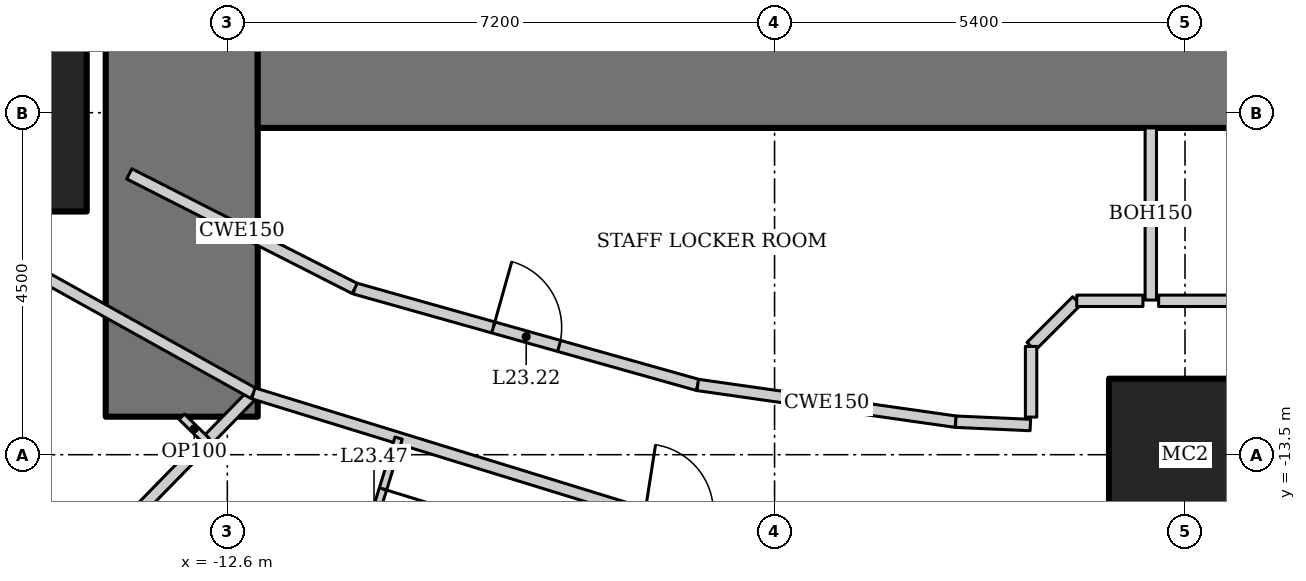
"""IFC4 building model, lengths in metres.
Left out: names, types, materials, properties, quantities, classifications, styles, units other than length and angle.
Written with IfcOpenShell. Run it as: python <this file> out.ifc"""

import sys

from ifc_helpers import new_model, si_unit, direction, frame, frame_2d, origin, origin_2d, place, context, subcontext, project, spatial, rectangle, hollow_rectangle, extrude, element, fill, save


model = new_model("IFC4")
c1 = context("Model", 3, precision=1e-05, world=origin(), true_north=direction((0.0, 1.0)))
c2 = subcontext(c1, "Body", "Model", "MODEL_VIEW")
j1 = project(units=[si_unit("LENGTHUNIT", "METRE"), si_unit("PLANEANGLEUNIT", "RADIAN")], contexts=[c1])
p1 = place(None, origin())
s1 = spatial("IfcSite", under=j1, at=p1, CompositionType="ELEMENT")
p2 = place(p1, origin())
s2 = spatial("IfcBuilding", under=s1, at=p2, CompositionType="ELEMENT")
p3 = place(p2, frame((0.0, 0.0, 98.2)))
s3 = spatial("IfcBuildingStorey", under=s2, at=p3, CompositionType="ELEMENT", Elevation=98.2)
p4 = place(p3, frame((-15.75, -9.0, 0.0), z_axis=(0.0, 0.0, 1.0), x_axis=(1.0, 0.0, 0.0)))
e1 = element("IfcColumn", 1, at=p4, inside=s3, PredefinedType="COLUMN", context=c2, shape_type="SweptSolid", body=[
    extrude(hollow_rectangle(XDim=2.6, YDim=2.6, WallThickness=0.13, at=origin_2d()), origin(), (0.0, 0.0, 1.0), 3.6),
])
p5 = place(p3, frame((0.0, -13.5, 0.0), z_axis=(0.0, 0.0, 1.0), x_axis=(1.0, 0.0, 0.0)))
e2 = element("IfcColumn", 2, at=p5, inside=s3, PredefinedType="COLUMN", context=c2, shape_type="SweptSolid", body=[
    extrude(hollow_rectangle(XDim=2.0, YDim=2.0, WallThickness=0.17, at=origin_2d()), origin(), (0.0, 0.0, 1.0), 3.6),
])
p6 = place(p3, frame((-13.2, 13.0, 0.0), z_axis=(0.0, 0.0, 1.0), x_axis=(0.0, -1.0, 0.0)))
e3 = element("IfcWall", 3, at=p6, inside=s3, PredefinedType="SHEAR", context=c2, shape_type="SweptSolid", body=[
    extrude(rectangle(XDim=26.0, YDim=2.0, at=frame_2d((13.0, 0.0))), origin(), (0.0, 0.0, 1.0), 3.6),
])
p7 = place(p6, frame((12.1, 0.0, 0.0)))
e4 = element("IfcOpeningElement", 4, at=p7, cuts=e3, PredefinedType="OPENING", context=c2, shape_type="SweptSolid", body=[
    extrude(rectangle(XDim=1.8, YDim=2.1, at=frame_2d((0.9, 1.05))), frame((0.0, 1.01, 0.0), z_axis=(0.0, -1.0, 0.0), x_axis=(1.0, 0.0, 0.0)), (0.0, 0.0, 1.0), 2.02),
])
p8 = place(p3, frame((-12.2, -8.0, 0.0), z_axis=(0.0, 0.0, 1.0), x_axis=(1.0, 0.0, 0.0)))
e5 = element("IfcWall", 5, at=p8, inside=s3, PredefinedType="SHEAR", context=c2, shape_type="SweptSolid", body=[
    extrude(rectangle(XDim=24.4, YDim=2.4, at=frame_2d((12.2, 0.0))), origin(), (0.0, 0.0, 1.0), 3.6),
])
p9 = place(p3, frame((-17.97, -18.542, 0.0), z_axis=(0.0, 0.0, 1.0), x_axis=(0.698757291878, 0.715358823981, 0.0)))
e6 = element("IfcWall", 6, at=p9, inside=s3, PredefinedType="PARTITIONING", context=c2, shape_type="SweptSolid", body=[
    extrude(rectangle(XDim=8.177, YDim=0.15, at=frame_2d((4.088, 0.0))), origin(), (0.0, 0.0, 1.0), 2.528),
])
p10 = place(p3, frame((-17.299, -9.885, 0.0), z_axis=(0.0, 0.0, 1.0), x_axis=(0.873695910579, -0.486472461541, 0.0)))
e7 = element("IfcWall", 7, at=p10, inside=s3, PredefinedType="PARTITIONING", context=c2, shape_type="SweptSolid", body=[
    extrude(rectangle(XDim=5.771, YDim=0.15, at=frame_2d((2.885, 0.0))), origin(), (0.0, 0.0, 1.0), 3.45),
])
p11 = place(p3, frame((-12.257, -12.693, 0.0), z_axis=(0.0, 0.0, 1.0), x_axis=(0.955657956744, -0.294478980085, 0.0)))
e8 = element("IfcWall", 8, at=p11, inside=s3, PredefinedType="PARTITIONING", context=c2, shape_type="SweptSolid", body=[
    extrude(rectangle(XDim=5.236, YDim=0.15, at=frame_2d((2.618, 0.0))), origin(), (0.0, 0.0, 1.0), 3.45),
])
p12 = place(p3, frame((-10.924, -11.312, 0.0), z_axis=(0.0, 0.0, 1.0), x_axis=(0.962643729928, -0.270771211967, 0.0)))
e9 = element("IfcWall", 9, at=p12, inside=s3, PredefinedType="PARTITIONING", context=c2, shape_type="SweptSolid", body=[
    extrude(rectangle(XDim=4.688, YDim=0.15, at=frame_2d((2.344, 0.0))), origin(), (0.0, 0.0, 1.0), 3.45),
])
p13 = place(p12, frame((1.894, 0.0, 0.0)))
e10 = element("IfcOpeningElement", 10, at=p13, cuts=e9, PredefinedType="OPENING", context=c2, shape_type="SweptSolid", body=[
    extrude(rectangle(XDim=0.9, YDim=2.1, at=frame_2d((0.45, 1.05))), frame((0.0, 0.085, 0.0), z_axis=(0.0, -1.0, 0.0), x_axis=(1.0, 0.0, 0.0)), (0.0, 0.0, 1.0), 0.17),
])
p14 = place(p3, frame((-6.411, -12.582, 0.0), z_axis=(0.0, 0.0, 1.0), x_axis=(0.990002114939, -0.14105251652, 0.0)))
e11 = element("IfcWall", 11, at=p14, inside=s3, PredefinedType="PARTITIONING", context=c2, shape_type="SweptSolid", body=[
    extrude(rectangle(XDim=3.429, YDim=0.15, at=frame_2d((1.714, 0.0))), origin(), (0.0, 0.0, 1.0), 3.45),
])
p15 = place(p3, frame((-10.346, -13.281, 0.0), z_axis=(0.0, 0.0, 1.0), x_axis=(-0.294478957423, -0.955657963727, 0.0)))
e12 = element("IfcWall", 12, at=p15, inside=s3, PredefinedType="PARTITIONING", context=c2, shape_type="SweptSolid", body=[
    extrude(rectangle(XDim=2.4, YDim=0.1, at=frame_2d((1.2, 0.0))), origin(), (0.0, 0.0, 1.0), 3.45),
])
p16 = place(p15, frame((0.7, 0.0, 0.0)))
e13 = element("IfcOpeningElement", 13, at=p16, cuts=e12, PredefinedType="OPENING", context=c2, shape_type="SweptSolid", body=[
    extrude(rectangle(XDim=0.8, YDim=2.1, at=frame_2d((0.4, 1.05))), frame((0.0, 0.06, 0.0), z_axis=(0.0, -1.0, 0.0), x_axis=(1.0, 0.0, 0.0)), (0.0, 0.0, 1.0), 0.12),
])
p17 = place(p3, frame((-13.2, -13.0, 0.0), z_axis=(0.0, 0.0, 1.0), x_axis=(0.715289751842, -0.698827998087, 0.0)))
e14 = element("IfcWall", 14, at=p17, inside=s3, PredefinedType="PARTITIONING", context=c2, shape_type="SweptSolid", body=[
    extrude(rectangle(XDim=0.46, YDim=0.1, at=frame_2d((0.23, 0.0))), origin(), (0.0, 0.0, 1.0), 3.45),
])
p18 = place(p3, frame((-13.89, -9.805, 0.0), z_axis=(0.0, 0.0, 1.0), x_axis=(0.891398195277, -0.453220980821, 0.0)))
e15 = element("IfcWall", 15, at=p18, inside=s3, PredefinedType="PARTITIONING", context=c2, shape_type="SweptSolid", body=[
    extrude(rectangle(XDim=3.327, YDim=0.15, at=frame_2d((1.664, 0.0))), origin(), (0.0, 0.0, 1.0), 3.45),
])
p19 = place(p3, frame((-3.016, -13.066, 0.0), z_axis=(0.0, 0.0, 1.0), x_axis=(0.999010128674, -0.044483286824, 0.0)))
e16 = element("IfcWall", 16, at=p19, inside=s3, PredefinedType="PARTITIONING", context=c2, shape_type="SweptSolid", body=[
    extrude(rectangle(XDim=0.982, YDim=0.15, at=frame_2d((0.491, 0.0))), origin(), (0.0, 0.0, 1.0), 3.45),
])
p20 = place(p3, frame((-0.45, -9.2, 0.0), z_axis=(0.0, 0.0, 1.0), x_axis=(0.0, -1.0, 0.0)))
e17 = element("IfcWall", 17, at=p20, inside=s3, PredefinedType="PARTITIONING", context=c2, shape_type="SweptSolid", body=[
    extrude(rectangle(XDim=2.265, YDim=0.15, at=frame_2d((1.133, 0.0))), origin(), (0.0, 0.0, 1.0), 3.45),
])
p21 = place(p3, frame((-2.025, -12.075, 0.0), z_axis=(0.0, 0.0, 1.0), x_axis=(0.707106781187, 0.707106781187, 0.0)))
e18 = element("IfcWall", 18, at=p21, inside=s3, PredefinedType="PARTITIONING", context=c2, shape_type="SweptSolid", body=[
    extrude(rectangle(XDim=0.849, YDim=0.15, at=frame_2d((0.425, 0.0))), origin(), (0.0, 0.0, 1.0), 3.45),
])
p22 = place(p3, frame((-1.425, -11.475, 0.0), z_axis=(0.0, 0.0, 1.0), x_axis=(1.0, 0.0, 0.0)))
e19 = element("IfcWall", 19, at=p22, inside=s3, PredefinedType="PARTITIONING", context=c2, shape_type="SweptSolid", body=[
    extrude(rectangle(XDim=0.871, YDim=0.15, at=frame_2d((0.436, 0.0))), origin(), (0.0, 0.0, 1.0), 3.45),
])
p23 = place(p3, frame((-2.025, -13.005, 0.0), z_axis=(0.0, 0.0, 1.0), x_axis=(0.0, 1.0, 0.0)))
e20 = element("IfcWall", 20, at=p23, inside=s3, PredefinedType="PARTITIONING", context=c2, shape_type="SweptSolid", body=[
    extrude(rectangle(XDim=0.93, YDim=0.15, at=frame_2d((0.465, 0.0))), origin(), (0.0, 0.0, 1.0), 2.749),
])
p24 = place(p3, frame((-0.347, -11.475, 0.0), z_axis=(0.0, 0.0, 1.0), x_axis=(1.0, 0.0, 0.0)))
e21 = element("IfcWall", 21, at=p24, inside=s3, PredefinedType="PARTITIONING", context=c2, shape_type="SweptSolid", body=[
    extrude(rectangle(XDim=1.771, YDim=0.15, at=frame_2d((0.886, 0.0))), origin(), (0.0, 0.0, 1.0), 3.45),
])
p25 = place(p13, origin())
e22 = element("IfcDoor", 22, at=p25, inside=s3, OperationType="SINGLE_SWING_LEFT", PredefinedType="DOOR", context=c2, shape_type="SweptSolid", body=[
    extrude(rectangle(XDim=0.9, YDim=2.1, at=frame_2d((0.45, 1.05))), frame((0.0, 0.025, 0.0), z_axis=(0.0, -1.0, 0.0), x_axis=(1.0, 0.0, 0.0)), (0.0, 0.0, 1.0), 0.05),
])
fill(e10, e22)
p26 = place(p16, origin())
e23 = element("IfcDoor", 23, at=p26, inside=s3, OperationType="SINGLE_SWING_LEFT", PredefinedType="DOOR", context=c2, shape_type="SweptSolid", body=[
    extrude(rectangle(XDim=0.8, YDim=2.1, at=frame_2d((0.4, 1.05))), frame((0.0, 0.025, 0.0), z_axis=(0.0, -1.0, 0.0), x_axis=(1.0, 0.0, 0.0)), (0.0, 0.0, 1.0), 0.05),
])
fill(e13, e23)
save(model, sys.argv[1])
